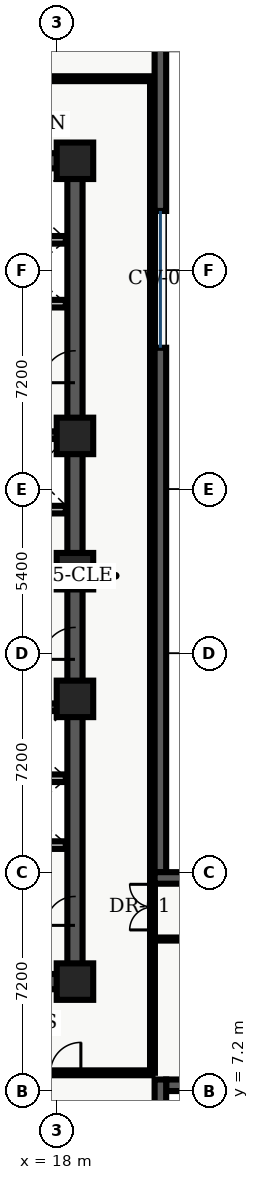
"""IFC4 building model, lengths in metres.
Left out: names, types, materials, properties, quantities, classifications, styles, units other than length and angle.
Written with IfcOpenShell. Run it as: python <this file> out.ifc"""

import sys

from ifc_helpers import new_model, entity, si_unit, converted_unit, direction, frame, origin_with_axes, origin_2d_with_axis, place, context, subcontext, project, spatial, polyline, rectangle, outline, extrude, element, fill, save


model = new_model("IFC4")
c1 = context("Model", 3, precision=1e-05, world=origin_with_axes(), true_north=direction((0.0, 1.0)))
c2 = subcontext(c1, "Body", "Model", "MODEL_VIEW")
j1 = project(units=[si_unit("LENGTHUNIT", "METRE"), converted_unit("PLANEANGLEUNIT", "DEGREE", entity("IfcPlaneAngleMeasure", 0.017), si_unit("PLANEANGLEUNIT", "RADIAN"), dimensions=[0, 0, 0, 0, 0, 0, 0])], contexts=[c1])
p1 = place(None, origin_with_axes())
s1 = spatial("IfcSite", under=j1, at=p1, CompositionType="ELEMENT")
p2 = place(p1, origin_with_axes())
s2 = spatial("IfcBuilding", under=s1, at=p2, CompositionType="ELEMENT")
p3 = place(p2, frame((0.0, 0.0, 104.7), z_axis=(0.0, 0.0, 1.0), x_axis=(1.0, 0.0, 0.0)))
s3 = spatial("IfcBuildingStorey", under=s2, at=p3, CompositionType="ELEMENT", Elevation=104.7)
p4 = place(p3, frame((11.4, 10.8, 0.0), z_axis=(0.0, 0.0, 1.0), x_axis=(1.0, 0.0, 0.0)))
e1 = element("IfcWall", 1, at=p4, inside=s3, PredefinedType="SHEAR", context=c2, shape_type="SweptSolid", body=[
    extrude(outline(polyline([(0.0, -0.25), (7.2, -0.25), (7.2, 0.25), (0.0, 0.25), (0.0, -0.25)])), origin_with_axes(), (0.0, 0.0, 1.0), 3.66),
])
p5 = place(p4, frame((2.625, 0.0, 0.0), z_axis=(0.0, 0.0, 1.0), x_axis=(1.0, 0.0, 0.0)))
e2 = element("IfcOpeningElement", 2, at=p5, cuts=e1, PredefinedType="OPENING", context=c2, shape_type="SweptSolid", body=[
    extrude(rectangle(XDim=1.05, YDim=0.52, at=origin_2d_with_axis()), origin_with_axes(), (0.0, 0.0, 1.0), 2.15),
])
p6 = place(p3, frame((11.4, 37.8, 0.0), z_axis=(0.0, 0.0, 1.0), x_axis=(1.0, 0.0, 0.0)))
e3 = element("IfcWall", 3, at=p6, inside=s3, PredefinedType="SHEAR", context=c2, shape_type="SweptSolid", body=[
    extrude(outline(polyline([(0.0, -0.25), (7.2, -0.25), (7.2, 0.25), (0.0, 0.25), (0.0, -0.25)])), origin_with_axes(), (0.0, 0.0, 1.0), 3.66),
])
p7 = place(p6, frame((2.625, 0.0, 0.0), z_axis=(0.0, 0.0, 1.0), x_axis=(1.0, 0.0, 0.0)))
e4 = element("IfcOpeningElement", 4, at=p7, cuts=e3, PredefinedType="OPENING", context=c2, shape_type="SweptSolid", body=[
    extrude(rectangle(XDim=1.05, YDim=0.52, at=origin_2d_with_axis()), origin_with_axes(), (0.0, 0.0, 1.0), 2.15),
])
p8 = place(p3, frame((18.6, 10.8, 0.0), z_axis=(0.0, 0.0, 1.0), x_axis=(0.0, 1.0, 0.0)))
e5 = element("IfcWall", 5, at=p8, inside=s3, PredefinedType="SHEAR", context=c2, shape_type="SweptSolid", body=[
    extrude(outline(polyline([(0.0, -0.25), (13.5, -0.25), (13.5, 0.25), (0.0, 0.25), (0.0, -0.25)])), origin_with_axes(), (0.0, 0.0, 1.0), 3.66),
])
p9 = place(p8, frame((11.125, 0.0, 0.0), z_axis=(0.0, 0.0, 1.0), x_axis=(1.0, 0.0, 0.0)))
e6 = element("IfcOpeningElement", 6, at=p9, cuts=e5, PredefinedType="OPENING", context=c2, shape_type="SweptSolid", body=[
    extrude(rectangle(XDim=1.05, YDim=0.52, at=origin_2d_with_axis()), origin_with_axes(), (0.0, 0.0, 1.0), 2.15),
])
p10 = place(p8, frame((2.325, 0.0, 0.0), z_axis=(0.0, 0.0, 1.0), x_axis=(1.0, 0.0, 0.0)))
e7 = element("IfcOpeningElement", 7, at=p10, cuts=e5, PredefinedType="OPENING", context=c2, shape_type="SweptSolid", body=[
    extrude(rectangle(XDim=0.95, YDim=0.52, at=origin_2d_with_axis()), origin_with_axes(), (0.0, 0.0, 1.0), 2.15),
])
p11 = place(p3, frame((18.6, 24.3, 0.0), z_axis=(0.0, 0.0, 1.0), x_axis=(0.0, 1.0, 0.0)))
e8 = element("IfcWall", 8, at=p11, inside=s3, PredefinedType="SHEAR", context=c2, shape_type="SweptSolid", body=[
    extrude(outline(polyline([(0.0, -0.25), (13.5, -0.25), (13.5, 0.25), (0.0, 0.25), (0.0, -0.25)])), origin_with_axes(), (0.0, 0.0, 1.0), 3.66),
])
p12 = place(p11, frame((6.725, 0.0, 0.0), z_axis=(0.0, 0.0, 1.0), x_axis=(1.0, 0.0, 0.0)))
e9 = element("IfcOpeningElement", 9, at=p12, cuts=e8, PredefinedType="OPENING", context=c2, shape_type="SweptSolid", body=[
    extrude(rectangle(XDim=1.05, YDim=0.52, at=origin_2d_with_axis()), origin_with_axes(), (0.0, 0.0, 1.0), 2.15),
])
for number, where, z_axis, x_axis in (
    (10, (11.65, 19.825, 0.0), (0.0, 0.0, 1.0), (1.0, 0.0, 0.0)),
    (11, (11.65, 28.775, 0.0), (0.0, 0.0, 1.0), (1.0, 0.0, 0.0)),
):
    element("IfcWall", number, at=place(p3, frame(where, z_axis=z_axis, x_axis=x_axis)), inside=s3, PredefinedType="SHEAR", context=c2, shape_type="SweptSolid", body=[
        extrude(outline(polyline([(0.0, -0.125), (6.7, -0.125), (6.7, 0.125), (0.0, 0.125), (0.0, -0.125)])), origin_with_axes(), (0.0, 0.0, 1.0), 3.66),
    ])
p13 = place(p3, frame((11.7, 24.1, 0.0), z_axis=(0.0, 0.0, 1.0), x_axis=(1.0, 0.0, 0.0)))
e12 = element("IfcWall", 12, at=p13, inside=s3, PredefinedType="SOLIDWALL", context=c2, shape_type="SweptSolid", body=[
    extrude(outline(polyline([(0.0, -0.125), (6.6, -0.125), (6.6, 0.125), (0.0, 0.125), (0.0, -0.125)])), origin_with_axes(), (0.0, 0.0, 1.0), 2.7),
])
p14 = place(p13, frame((3.75, 0.0, 0.0), z_axis=(0.0, 0.0, 1.0), x_axis=(1.0, 0.0, 0.0)))
e13 = element("IfcOpeningElement", 13, at=p14, cuts=e12, PredefinedType="OPENING", context=c2, shape_type="SweptSolid", body=[
    extrude(rectangle(XDim=0.9, YDim=0.27, at=origin_2d_with_axis()), origin_with_axes(), (0.0, 0.0, 1.0), 2.15),
])
p15 = place(p3, frame((11.7, 26.325, 0.0), z_axis=(0.0, 0.0, 1.0), x_axis=(1.0, 0.0, 0.0)))
e14 = element("IfcWall", 14, at=p15, inside=s3, PredefinedType="SOLIDWALL", context=c2, shape_type="SweptSolid", body=[
    extrude(outline(polyline([(0.0, -0.125), (6.6, -0.125), (6.6, 0.125), (0.0, 0.125), (0.0, -0.125)])), origin_with_axes(), (0.0, 0.0, 1.0), 2.7),
])
p16 = place(p15, frame((3.5, 0.0, 0.0), z_axis=(0.0, 0.0, 1.0), x_axis=(1.0, 0.0, 0.0)))
e15 = element("IfcOpeningElement", 15, at=p16, cuts=e14, PredefinedType="OPENING", context=c2, shape_type="SweptSolid", body=[
    extrude(rectangle(XDim=0.9, YDim=0.27, at=origin_2d_with_axis()), origin_with_axes(), (0.0, 0.0, 1.0), 2.15),
])
for number, where, z_axis, x_axis in (
    (16, (18.6, 10.8, 0.0), (0.0, 0.0, 1.0), (1.0, 0.0, 0.0)),
    (17, (18.6, 20.1, 0.0), (0.0, 0.0, 1.0), (1.0, 0.0, 0.0)),
    (18, (18.6, 24.3, 0.0), (0.0, 0.0, 1.0), (1.0, 0.0, 0.0)),
    (19, (18.6, 28.75, 0.0), (0.0, 0.0, 1.0), (1.0, 0.0, 0.0)),
    (20, (18.6, 37.8, 0.0), (0.0, 0.0, 1.0), (1.0, 0.0, 0.0)),
):
    element("IfcColumn", number, at=place(p3, frame(where, z_axis=z_axis, x_axis=x_axis)), inside=s3, PredefinedType="COLUMN", context=c2, shape_type="SweptSolid", body=[
        extrude(rectangle(XDim=1.2, YDim=1.2, at=origin_2d_with_axis()), origin_with_axes(), (0.0, 0.0, 1.0), 3.9),
    ])
for number, where, z_axis, x_axis in (
    (21, (15.84, 15.29, 0.0), (0.0, 0.0, 1.0), (1.0, 0.0, 0.0)),
    (22, (15.84, 17.49, 0.0), (0.0, 0.0, 1.0), (1.0, 0.0, 0.0)),
    (23, (15.84, 33.1, 0.0), (0.0, 0.0, 1.0), (1.0, 0.0, 0.0)),
    (24, (15.84, 35.2, 0.0), (0.0, 0.0, 1.0), (1.0, 0.0, 0.0)),
):
    element("IfcWall", number, at=place(p3, frame(where, z_axis=z_axis, x_axis=x_axis)), inside=s3, PredefinedType="SOLIDWALL", context=c2, shape_type="SweptSolid", body=[
        extrude(outline(polyline([(0.0, -0.125), (2.46, -0.125), (2.46, 0.125), (0.0, 0.125), (0.0, -0.125)])), origin_with_axes(), (0.0, 0.0, 1.0), 2.7),
    ])
p17 = place(p3, frame((2.6, 7.8, 0.0), z_axis=(0.0, 0.0, 1.0), x_axis=(1.0, 0.0, 0.0)))
e25 = element("IfcWall", 25, at=p17, inside=s3, PredefinedType="PARTITIONING", context=c2, shape_type="SweptSolid", body=[
    extrude(outline(polyline([(0.0, -0.08), (18.55, -0.08), (18.55, 0.08), (0.0, 0.08), (0.0, -0.08)])), origin_with_axes(), (0.0, 0.0, 1.0), 2.7),
])
p18 = place(p17, frame((1.848, 0.0, 0.0), z_axis=(0.0, 0.0, 1.0), x_axis=(1.0, 0.0, 0.0)))
e26 = element("IfcOpeningElement", 26, at=p18, cuts=e25, PredefinedType="OPENING", context=c2, shape_type="SweptSolid", body=[
    extrude(rectangle(XDim=1.0, YDim=0.18, at=origin_2d_with_axis()), origin_with_axes(), (0.0, 0.0, 1.0), 2.15),
])
p19 = place(p17, frame((6.253, 0.0, 0.0), z_axis=(0.0, 0.0, 1.0), x_axis=(1.0, 0.0, 0.0)))
e27 = element("IfcOpeningElement", 27, at=p19, cuts=e25, PredefinedType="OPENING", context=c2, shape_type="SweptSolid", body=[
    extrude(rectangle(XDim=1.0, YDim=0.18, at=origin_2d_with_axis()), origin_with_axes(), (0.0, 0.0, 1.0), 2.15),
])
p20 = place(p17, frame((10.845, 0.0, 0.0), z_axis=(0.0, 0.0, 1.0), x_axis=(1.0, 0.0, 0.0)))
e28 = element("IfcOpeningElement", 28, at=p20, cuts=e25, PredefinedType="OPENING", context=c2, shape_type="SweptSolid", body=[
    extrude(rectangle(XDim=1.0, YDim=0.18, at=origin_2d_with_axis()), origin_with_axes(), (0.0, 0.0, 1.0), 2.15),
])
p21 = place(p17, frame((15.694, 0.0, 0.0), z_axis=(0.0, 0.0, 1.0), x_axis=(1.0, 0.0, 0.0)))
e29 = element("IfcOpeningElement", 29, at=p21, cuts=e25, PredefinedType="OPENING", context=c2, shape_type="SweptSolid", body=[
    extrude(rectangle(XDim=1.0, YDim=0.18, at=origin_2d_with_axis()), origin_with_axes(), (0.0, 0.0, 1.0), 2.15),
])
p22 = place(p3, frame((2.6, 40.5, 0.0), z_axis=(0.0, 0.0, 1.0), x_axis=(1.0, 0.0, 0.0)))
e30 = element("IfcWall", 30, at=p22, inside=s3, PredefinedType="PARTITIONING", context=c2, shape_type="SweptSolid", body=[
    extrude(outline(polyline([(0.0, -0.08), (18.65, -0.08), (18.65, 0.08), (0.0, 0.08), (0.0, -0.08)])), origin_with_axes(), (0.0, 0.0, 1.0), 2.7),
])
p23 = place(p22, frame((1.663, 0.0, 0.0), z_axis=(0.0, 0.0, 1.0), x_axis=(1.0, 0.0, 0.0)))
e31 = element("IfcOpeningElement", 31, at=p23, cuts=e30, PredefinedType="OPENING", context=c2, shape_type="SweptSolid", body=[
    extrude(rectangle(XDim=1.0, YDim=0.18, at=origin_2d_with_axis()), origin_with_axes(), (0.0, 0.0, 1.0), 2.15),
])
p24 = place(p22, frame((6.069, 0.0, 0.0), z_axis=(0.0, 0.0, 1.0), x_axis=(1.0, 0.0, 0.0)))
e32 = element("IfcOpeningElement", 32, at=p24, cuts=e30, PredefinedType="OPENING", context=c2, shape_type="SweptSolid", body=[
    extrude(rectangle(XDim=1.0, YDim=0.18, at=origin_2d_with_axis()), origin_with_axes(), (0.0, 0.0, 1.0), 2.15),
])
p25 = place(p22, frame((10.015, 0.0, 0.0), z_axis=(0.0, 0.0, 1.0), x_axis=(1.0, 0.0, 0.0)))
e33 = element("IfcOpeningElement", 33, at=p25, cuts=e30, PredefinedType="OPENING", context=c2, shape_type="SweptSolid", body=[
    extrude(rectangle(XDim=1.0, YDim=0.18, at=origin_2d_with_axis()), origin_with_axes(), (0.0, 0.0, 1.0), 2.15),
])
p26 = place(p22, frame((13.825, 0.0, 0.0), z_axis=(0.0, 0.0, 1.0), x_axis=(1.0, 0.0, 0.0)))
e34 = element("IfcOpeningElement", 34, at=p26, cuts=e30, PredefinedType="OPENING", context=c2, shape_type="SweptSolid", body=[
    extrude(rectangle(XDim=1.0, YDim=0.18, at=origin_2d_with_axis()), origin_with_axes(), (0.0, 0.0, 1.0), 2.15),
])
p27 = place(p3, frame((21.15, 7.8, 0.0), z_axis=(0.0, 0.0, 1.0), x_axis=(0.0, 1.0, 0.0)))
e35 = element("IfcWall", 35, at=p27, inside=s3, PredefinedType="PARTITIONING", context=c2, shape_type="SweptSolid", body=[
    extrude(outline(polyline([(0.0, -0.08), (32.7, -0.08), (32.7, 0.08), (0.0, 0.08), (0.0, -0.08)])), origin_with_axes(), (0.0, 0.0, 1.0), 2.7),
])
p28 = place(p27, frame((5.45, 0.0, 0.0), z_axis=(0.0, 0.0, 1.0), x_axis=(1.0, 0.0, 0.0)))
e36 = element("IfcOpeningElement", 36, at=p28, cuts=e35, PredefinedType="OPENING", context=c2, shape_type="SweptSolid", body=[
    extrude(rectangle(XDim=1.5, YDim=0.18, at=origin_2d_with_axis()), origin_with_axes(), (0.0, 0.0, 1.0), 2.2),
])
p29 = place(p3, frame((21.15, 12.2, 0.0), z_axis=(0.0, 0.0, 1.0), x_axis=(1.0, 0.0, 0.0)))
e37 = element("IfcWall", 37, at=p29, inside=s3, PredefinedType="PARTITIONING", context=c2, shape_type="SweptSolid", body=[
    extrude(outline(polyline([(0.0, -0.05), (15.2, -0.05), (15.2, 0.05), (0.0, 0.05), (0.0, -0.05)])), origin_with_axes(), (0.0, 0.0, 1.0), 2.7),
])
p30 = place(p29, frame((7.7, 0.0, 0.0), z_axis=(0.0, 0.0, 1.0), x_axis=(1.0, 0.0, 0.0)))
e38 = element("IfcOpeningElement", 38, at=p30, cuts=e37, PredefinedType="OPENING", context=c2, shape_type="SweptSolid", body=[
    extrude(rectangle(XDim=1.0, YDim=0.12, at=origin_2d_with_axis()), origin_with_axes(), (0.0, 0.0, 1.0), 2.15),
])
p31 = place(p3, frame((38.78, 7.39, 0.0), z_axis=(0.0, 0.0, 1.0), x_axis=(-1.0, 0.0, 0.0)))
e39 = element("IfcWall", 39, at=p31, inside=s3, PredefinedType="SOLIDWALL", context=c2, shape_type="SweptSolid", body=[
    extrude(outline(polyline([(0.0, -0.19), (17.18, -0.19), (17.18, 0.19), (0.0, 0.19), (0.0, -0.19)])), origin_with_axes(), (0.0, 0.0, 1.0), 3.66),
])
p32 = place(p31, frame((4.113, 0.0, 0.45), z_axis=(0.0, 0.0, 1.0), x_axis=(1.0, 0.0, 0.0)))
e40 = element("IfcOpeningElement", 40, at=p32, cuts=e39, PredefinedType="OPENING", context=c2, shape_type="SweptSolid", body=[
    extrude(rectangle(XDim=2.1, YDim=0.4, at=origin_2d_with_axis()), origin_with_axes(), (0.0, 0.0, 1.0), 2.2),
])
p33 = place(p31, frame((8.59, 0.0, 0.45), z_axis=(0.0, 0.0, 1.0), x_axis=(1.0, 0.0, 0.0)))
e41 = element("IfcOpeningElement", 41, at=p33, cuts=e39, PredefinedType="OPENING", context=c2, shape_type="SweptSolid", body=[
    extrude(rectangle(XDim=2.1, YDim=0.4, at=origin_2d_with_axis()), origin_with_axes(), (0.0, 0.0, 1.0), 2.2),
])
p34 = place(p31, frame((13.917, 0.0, 0.45), z_axis=(0.0, 0.0, 1.0), x_axis=(1.0, 0.0, 0.0)))
e42 = element("IfcOpeningElement", 42, at=p34, cuts=e39, PredefinedType="OPENING", context=c2, shape_type="SweptSolid", body=[
    extrude(rectangle(XDim=2.1, YDim=0.4, at=origin_2d_with_axis()), origin_with_axes(), (0.0, 0.0, 1.0), 2.2),
])
p35 = place(p3, frame((21.41, 7.58, 0.0), z_axis=(0.0, 0.0, 1.0), x_axis=(0.0, -1.0, 0.0)))
e43 = element("IfcWall", 43, at=p35, inside=s3, PredefinedType="SOLIDWALL", context=c2, shape_type="SweptSolid", body=[
    extrude(outline(polyline([(0.0, -0.19), (7.58, -0.19), (7.58, 0.19), (0.0, 0.19), (0.0, -0.19)])), origin_with_axes(), (0.0, 0.0, 1.0), 3.66),
])
p36 = place(p35, frame((3.79, 0.0, 0.45), z_axis=(0.0, 0.0, 1.0), x_axis=(1.0, 0.0, 0.0)))
e44 = element("IfcOpeningElement", 44, at=p36, cuts=e43, PredefinedType="OPENING", context=c2, shape_type="SweptSolid", body=[
    extrude(rectangle(XDim=2.1, YDim=0.4, at=origin_2d_with_axis()), origin_with_axes(), (0.0, 0.0, 1.0), 2.2),
])
p37 = place(p3, frame((21.41, 45.82, 0.0), z_axis=(0.0, 0.0, 1.0), x_axis=(0.0, -1.0, 0.0)))
e45 = element("IfcWall", 45, at=p37, inside=s3, PredefinedType="SOLIDWALL", context=c2, shape_type="SweptSolid", body=[
    extrude(outline(polyline([(0.0, -0.19), (9.67, -0.19), (9.67, 0.19), (0.0, 0.19), (0.0, -0.19)])), origin_with_axes(), (0.0, 0.0, 1.0), 3.66),
])
p38 = place(p3, frame((21.41, 31.65, 0.0), z_axis=(0.0, 0.0, 1.0), x_axis=(0.0, -1.0, 0.0)))
e46 = element("IfcWall", 46, at=p38, inside=s3, PredefinedType="SOLIDWALL", context=c2, shape_type="SweptSolid", body=[
    extrude(outline(polyline([(0.0, -0.19), (17.25, -0.19), (17.25, 0.19), (0.0, 0.19), (0.0, -0.19)])), origin_with_axes(), (0.0, 0.0, 1.0), 3.66),
])
p39 = place(p3, frame((21.22, 14.21, 0.0), z_axis=(0.0, 0.0, 1.0), x_axis=(1.0, 0.0, 0.0)))
e47 = element("IfcWall", 47, at=p39, inside=s3, PredefinedType="SOLIDWALL", context=c2, shape_type="SweptSolid", body=[
    extrude(outline(polyline([(0.0, -0.19), (17.18, -0.19), (17.18, 0.19), (0.0, 0.19), (0.0, -0.19)])), origin_with_axes(), (0.0, 0.0, 1.0), 3.66),
])
p40 = place(p39, frame((3.263, 0.0, 0.45), z_axis=(0.0, 0.0, 1.0), x_axis=(1.0, 0.0, 0.0)))
e48 = element("IfcOpeningElement", 48, at=p40, cuts=e47, PredefinedType="OPENING", context=c2, shape_type="SweptSolid", body=[
    extrude(rectangle(XDim=2.1, YDim=0.4, at=origin_2d_with_axis()), origin_with_axes(), (0.0, 0.0, 1.0), 2.2),
])
p41 = place(p39, frame((8.59, 0.0, 0.45), z_axis=(0.0, 0.0, 1.0), x_axis=(1.0, 0.0, 0.0)))
e49 = element("IfcOpeningElement", 49, at=p41, cuts=e47, PredefinedType="OPENING", context=c2, shape_type="SweptSolid", body=[
    extrude(rectangle(XDim=2.1, YDim=0.4, at=origin_2d_with_axis()), origin_with_axes(), (0.0, 0.0, 1.0), 2.2),
])
p42 = place(p39, frame((13.467, 0.0, 0.45), z_axis=(0.0, 0.0, 1.0), x_axis=(1.0, 0.0, 0.0)))
e50 = element("IfcOpeningElement", 50, at=p42, cuts=e47, PredefinedType="OPENING", context=c2, shape_type="SweptSolid", body=[
    extrude(rectangle(XDim=2.1, YDim=0.4, at=origin_2d_with_axis()), origin_with_axes(), (0.0, 0.0, 1.0), 2.2),
])
p43 = place(p8, frame((11.125, 0.0, 0.0), z_axis=(0.0, 0.0, 1.0), x_axis=(1.0, 0.0, 0.0)))
e51 = element("IfcDoor", 51, at=p43, inside=s3, OperationType="SINGLE_SWING_LEFT", PredefinedType="DOOR", context=c2, shape_type="SweptSolid", body=[
    extrude(rectangle(XDim=1.05, YDim=0.09, at=origin_2d_with_axis()), origin_with_axes(), (0.0, 0.0, 1.0), 2.15),
])
fill(e6, e51)
p44 = place(p8, frame((2.325, 0.0, 0.0), z_axis=(0.0, 0.0, 1.0), x_axis=(1.0, 0.0, 0.0)))
e52 = element("IfcDoor", 52, at=p44, inside=s3, OperationType="SINGLE_SWING_LEFT", PredefinedType="DOOR", context=c2, shape_type="SweptSolid", body=[
    extrude(rectangle(XDim=0.95, YDim=0.09, at=origin_2d_with_axis()), origin_with_axes(), (0.0, 0.0, 1.0), 2.15),
])
fill(e7, e52)
p45 = place(p11, frame((6.725, 0.0, 0.0), z_axis=(0.0, 0.0, 1.0), x_axis=(1.0, 0.0, 0.0)))
e53 = element("IfcDoor", 53, at=p45, inside=s3, OperationType="SINGLE_SWING_LEFT", PredefinedType="DOOR", context=c2, shape_type="SweptSolid", body=[
    extrude(rectangle(XDim=1.05, YDim=0.09, at=origin_2d_with_axis()), origin_with_axes(), (0.0, 0.0, 1.0), 2.15),
])
fill(e9, e53)
p46 = place(p17, frame((15.694, 0.0, 0.0), z_axis=(0.0, 0.0, 1.0), x_axis=(1.0, 0.0, 0.0)))
e54 = element("IfcDoor", 54, at=p46, inside=s3, OperationType="SINGLE_SWING_RIGHT", PredefinedType="DOOR", context=c2, shape_type="SweptSolid", body=[
    extrude(rectangle(XDim=1.0, YDim=0.09, at=origin_2d_with_axis()), origin_with_axes(), (0.0, 0.0, 1.0), 2.15),
])
fill(e29, e54)
p47 = place(p27, frame((5.45, 0.0, 0.0), z_axis=(0.0, 0.0, 1.0), x_axis=(1.0, 0.0, 0.0)))
e55 = element("IfcDoor", 55, at=p47, inside=s3, OperationType="DOUBLE_DOOR_SINGLE_SWING", PredefinedType="DOOR", context=c2, shape_type="SweptSolid", body=[
    extrude(rectangle(XDim=1.5, YDim=0.09, at=origin_2d_with_axis()), origin_with_axes(), (0.0, 0.0, 1.0), 2.2),
])
fill(e36, e55)
save(model, sys.argv[1])
